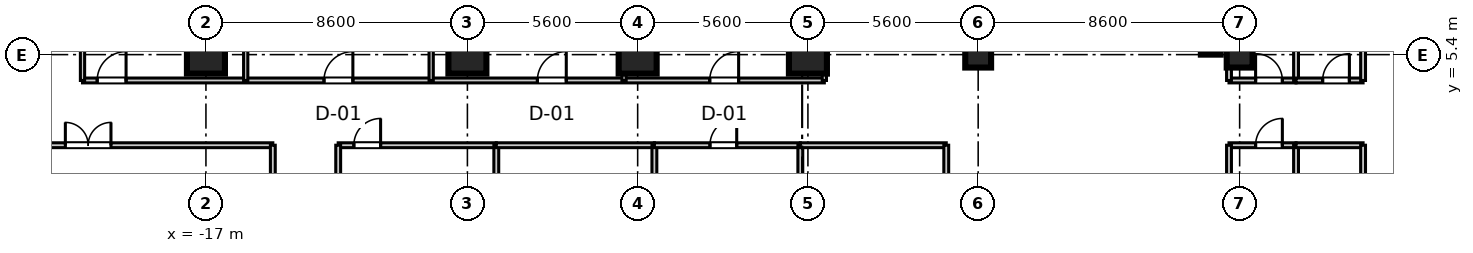
"""IFC4 building model, lengths in metres.
Left out: names, types, materials, properties, quantities, classifications, styles, units other than length and angle.
Written with IfcOpenShell. Run it as: python <this file> out.ifc"""

import sys

from ifc_helpers import new_model, si_unit, direction, frame, frame_2d, origin, origin_2d, place, context, subcontext, project, spatial, rectangle, extrude, source, transform, mapped, element, fill, save


model = new_model("IFC4")
c1 = context("Model", 3, precision=1e-05, world=origin(), true_north=direction((0.0, 1.0)))
c2 = subcontext(c1, "Body", "Model", "MODEL_VIEW")
j1 = project(units=[si_unit("LENGTHUNIT", "METRE"), si_unit("PLANEANGLEUNIT", "RADIAN")], contexts=[c1])
p1 = place(None, origin())
s1 = spatial("IfcSite", under=j1, at=p1, CompositionType="ELEMENT")
p2 = place(p1, origin())
s2 = spatial("IfcBuilding", under=s1, at=p2, CompositionType="ELEMENT")
p3 = place(p2, frame((0.0, 0.0, 132.1)))
s3 = spatial("IfcBuildingStorey", under=s2, at=p3, CompositionType="ELEMENT", Elevation=132.1)
m1 = source(origin(), c2, "Body", "SweptSolid", [
    extrude(rectangle(XDim=1.25, YDim=1.25, at=origin_2d()), origin(), (0.0, 0.0, 1.0), 3.605),
])
for number, where, z_axis, x_axis in (
    (1, (-17.0, 5.4, 0.0), (0.0, 0.0, 1.0), (1.0, 0.0, 0.0)),
    (2, (-8.4, 5.4, 0.0), (0.0, 0.0, 1.0), (1.0, 0.0, 0.0)),
    (3, (-2.8, 5.4, 0.0), (0.0, 0.0, 1.0), (1.0, 0.0, 0.0)),
    (4, (2.8, 5.4, 0.0), (0.0, 0.0, 1.0), (1.0, 0.0, 0.0)),
):
    element("IfcColumn", number, at=place(p3, frame(where, z_axis=z_axis, x_axis=x_axis)), inside=s3, PredefinedType="COLUMN", context=c2, shape_type="MappedRepresentation", body=[
        mapped(m1, transform((0.0, 0.0, 0.0), scale=1.0)),
    ])
m2 = source(origin(), c2, "Body", "SweptSolid", [
    extrude(rectangle(XDim=0.85, YDim=0.85, at=origin_2d()), origin(), (0.0, 0.0, 1.0), 3.605),
])
for number, where, z_axis, x_axis in (
    (5, (8.4, 5.4, 0.0), (0.0, 0.0, 1.0), (1.0, 0.0, 0.0)),
    (6, (17.0, 5.4, 0.0), (0.0, 0.0, 1.0), (1.0, 0.0, 0.0)),
):
    element("IfcColumn", number, at=place(p3, frame(where, z_axis=z_axis, x_axis=x_axis)), inside=s3, PredefinedType="PILASTER", context=c2, shape_type="MappedRepresentation", body=[
        mapped(m2, transform((0.0, 0.0, 0.0), scale=1.0)),
    ])
m3 = source(origin(), c2, "Body", "SweptSolid", [
    extrude(rectangle(XDim=11.6, YDim=0.65, at=frame_2d((5.8, 0.0))), origin(), (0.0, 0.0, 1.0), 3.38),
])
p4 = place(p3, frame((16.05, 5.4, 0.0), z_axis=(0.0, 0.0, 1.0), x_axis=(0.0, 1.0, 0.0)))
e7 = element("IfcWall", 7, at=p4, inside=s3, PredefinedType="SHEAR", context=c2, shape_type="MappedRepresentation", body=[
    mapped(m3, transform((0.0, 0.0, 0.0), scale=1.0)),
])
m4 = source(origin(), c2, "Body", "SweptSolid", [
    extrude(rectangle(XDim=2.205, YDim=0.16, at=frame_2d((1.103, 0.0))), origin(), (0.0, 0.0, 1.0), 2.72),
])
p5 = place(p3, frame((16.65, 4.55, 0.0), z_axis=(0.0, 0.0, 1.0), x_axis=(1.0, 0.0, 0.0)))
e8 = element("IfcWall", 8, at=p5, inside=s3, PredefinedType="PARTITIONING", context=c2, shape_type="MappedRepresentation", body=[
    mapped(m4, transform((0.0, 0.0, 0.0), scale=1.0)),
])
p6 = place(p5, frame((0.875, 0.0, 0.0)))
e9 = element("IfcOpeningElement", 9, at=p6, cuts=e8, PredefinedType="OPENING", context=c2, shape_type="SweptSolid", body=[
    extrude(rectangle(XDim=0.88, YDim=2.1, at=frame_2d((0.44, 1.05))), frame((0.0, 0.09, 0.0), z_axis=(0.0, -1.0, 0.0), x_axis=(1.0, 0.0, 0.0)), (0.0, 0.0, 1.0), 0.18),
])
m5 = source(origin(), c2, "Body", "SweptSolid", [
    extrude(rectangle(XDim=19.25, YDim=0.16, at=frame_2d((9.625, 0.0))), origin(), (0.0, 0.0, 1.0), 2.72),
])
for number, where, z_axis, x_axis in (
    (10, (16.65, 4.55, 0.0), (0.0, 0.0, 1.0), (0.0, 1.0, 0.0)),
    (11, (18.855, 4.55, 0.0), (0.0, 0.0, 1.0), (0.0, 1.0, 0.0)),
):
    element("IfcWall", number, at=place(p3, frame(where, z_axis=z_axis, x_axis=x_axis)), inside=s3, PredefinedType="PARTITIONING", context=c2, shape_type="MappedRepresentation", body=[
        mapped(m5, transform((0.0, 0.0, 0.0), scale=1.0)),
    ])
p7 = place(p3, frame((18.855, 4.55, 0.0), z_axis=(0.0, 0.0, 1.0), x_axis=(1.0, 0.0, 0.0)))
e12 = element("IfcWall", 12, at=p7, inside=s3, PredefinedType="PARTITIONING", context=c2, shape_type="MappedRepresentation", body=[
    mapped(m4, transform((0.0, 0.0, 0.0), scale=1.0)),
])
p8 = place(p7, frame((0.875, 0.0, 0.0)))
e13 = element("IfcOpeningElement", 13, at=p8, cuts=e12, PredefinedType="OPENING", context=c2, shape_type="SweptSolid", body=[
    extrude(rectangle(XDim=0.88, YDim=2.1, at=frame_2d((0.44, 1.05))), frame((0.0, 0.09, 0.0), z_axis=(0.0, -1.0, 0.0), x_axis=(1.0, 0.0, 0.0)), (0.0, 0.0, 1.0), 0.18),
])
m6 = source(origin(), c2, "Body", "SweptSolid", [
    extrude(rectangle(XDim=17.83, YDim=0.16, at=frame_2d((8.915, 0.0))), origin(), (0.0, 0.0, 1.0), 2.72),
])
p9 = place(p3, frame((21.06, 4.55, 0.0), z_axis=(0.0, 0.0, 1.0), x_axis=(0.0, 1.0, 0.0)))
e14 = element("IfcWall", 14, at=p9, inside=s3, PredefinedType="PARTITIONING", context=c2, shape_type="MappedRepresentation", body=[
    mapped(m6, transform((0.0, 0.0, 0.0), scale=1.0)),
])
m7 = source(origin(), c2, "Body", "SweptSolid", [
    extrude(rectangle(XDim=24.4, YDim=0.16, at=frame_2d((12.2, 0.0))), origin(), (0.0, 0.0, 1.0), 2.72),
])
p10 = place(p3, frame((-21.06, 4.55, 0.0), z_axis=(0.0, 0.0, 1.0), x_axis=(1.0, 0.0, 0.0)))
e15 = element("IfcWall", 15, at=p10, inside=s3, PredefinedType="PARTITIONING", context=c2, shape_type="MappedRepresentation", body=[
    mapped(m7, transform((0.0, 0.0, 0.0), scale=1.0)),
])
p11 = place(p10, frame((0.483, 0.0, 0.0)))
e16 = element("IfcOpeningElement", 16, at=p11, cuts=e15, PredefinedType="OPENING", context=c2, shape_type="SweptSolid", body=[
    extrude(rectangle(XDim=0.95, YDim=2.1, at=frame_2d((0.475, 1.05))), frame((0.0, 0.09, 0.0), z_axis=(0.0, -1.0, 0.0), x_axis=(1.0, 0.0, 0.0)), (0.0, 0.0, 1.0), 0.18),
])
p12 = place(p10, frame((7.943, 0.0, 0.0)))
e17 = element("IfcOpeningElement", 17, at=p12, cuts=e15, PredefinedType="OPENING", context=c2, shape_type="SweptSolid", body=[
    extrude(rectangle(XDim=0.95, YDim=2.1, at=frame_2d((0.475, 1.05))), frame((0.0, 0.09, 0.0), z_axis=(0.0, -1.0, 0.0), x_axis=(1.0, 0.0, 0.0)), (0.0, 0.0, 1.0), 0.18),
])
p13 = place(p10, frame((14.962, 0.0, 0.0)))
e18 = element("IfcOpeningElement", 18, at=p13, cuts=e15, PredefinedType="OPENING", context=c2, shape_type="SweptSolid", body=[
    extrude(rectangle(XDim=0.95, YDim=2.1, at=frame_2d((0.475, 1.05))), frame((0.0, 0.09, 0.0), z_axis=(0.0, -1.0, 0.0), x_axis=(1.0, 0.0, 0.0)), (0.0, 0.0, 1.0), 0.18),
])
p14 = place(p10, frame((20.631, 0.0, 0.0)))
e19 = element("IfcOpeningElement", 19, at=p14, cuts=e15, PredefinedType="OPENING", context=c2, shape_type="SweptSolid", body=[
    extrude(rectangle(XDim=0.95, YDim=2.1, at=frame_2d((0.475, 1.05))), frame((0.0, 0.09, 0.0), z_axis=(0.0, -1.0, 0.0), x_axis=(1.0, 0.0, 0.0)), (0.0, 0.0, 1.0), 0.18),
])
m8 = source(origin(), c2, "Body", "SweptSolid", [
    extrude(rectangle(XDim=17.83, YDim=0.14, at=frame_2d((8.915, 0.0))), origin(), (0.0, 0.0, 1.0), 2.72),
])
p15 = place(p3, frame((-21.06, 4.55, 0.0), z_axis=(0.0, 0.0, 1.0), x_axis=(0.0, 1.0, 0.0)))
e20 = element("IfcWall", 20, at=p15, inside=s3, PredefinedType="PARTITIONING", context=c2, shape_type="MappedRepresentation", body=[
    mapped(m8, transform((0.0, 0.0, 0.0), scale=1.0)),
])
m9 = source(origin(), c2, "Body", "SweptSolid", [
    extrude(rectangle(XDim=19.25, YDim=0.14, at=frame_2d((9.625, 0.0))), origin(), (0.0, 0.0, 1.0), 2.72),
])
for number, where, z_axis, x_axis in (
    (21, (3.34, 4.55, 0.0), (0.0, 0.0, 1.0), (0.0, 1.0, 0.0)),
    (22, (-15.692, 4.55, 0.0), (0.0, 0.0, 1.0), (0.0, 1.0, 0.0)),
    (23, (-9.592, 4.55, 0.0), (0.0, 0.0, 1.0), (0.0, 1.0, 0.0)),
    (24, (-3.248, 4.55, 0.0), (0.0, 0.0, 1.0), (0.0, 1.0, 0.0)),
):
    element("IfcWall", number, at=place(p3, frame(where, z_axis=z_axis, x_axis=x_axis)), inside=s3, PredefinedType="PARTITIONING", context=c2, shape_type="MappedRepresentation", body=[
        mapped(m9, transform((0.0, 0.0, 0.0), scale=1.0)),
    ])
m10 = source(origin(), c2, "Body", "SweptSolid", [
    extrude(rectangle(XDim=9.0, YDim=0.16, at=frame_2d((4.5, 0.0))), origin(), (0.0, 0.0, 1.0), 2.72),
])
p16 = place(p3, frame((-23.8, 2.42, 0.0), z_axis=(0.0, 0.0, 1.0), x_axis=(1.0, 0.0, 0.0)))
e25 = element("IfcWall", 25, at=p16, inside=s3, PredefinedType="PARTITIONING", context=c2, shape_type="MappedRepresentation", body=[
    mapped(m10, transform((0.0, 0.0, 0.0), scale=1.0)),
])
p17 = place(p16, frame((2.176, 0.0, 0.0)))
e26 = element("IfcOpeningElement", 26, at=p17, cuts=e25, PredefinedType="OPENING", context=c2, shape_type="SweptSolid", body=[
    extrude(rectangle(XDim=1.5, YDim=2.15, at=frame_2d((0.75, 1.075))), frame((0.0, 0.09, 0.0), z_axis=(0.0, -1.0, 0.0), x_axis=(1.0, 0.0, 0.0)), (0.0, 0.0, 1.0), 0.18),
])
m11 = source(origin(), c2, "Body", "SweptSolid", [
    extrude(rectangle(XDim=4.84, YDim=0.16, at=frame_2d((2.42, 0.0))), origin(), (0.0, 0.0, 1.0), 2.72),
])
p18 = place(p3, frame((-14.8, -2.42, 0.0), z_axis=(0.0, 0.0, 1.0), x_axis=(0.0, 1.0, 0.0)))
e27 = element("IfcWall", 27, at=p18, inside=s3, PredefinedType="PARTITIONING", context=c2, shape_type="MappedRepresentation", body=[
    mapped(m11, transform((0.0, 0.0, 0.0), scale=1.0)),
])
m12 = source(origin(), c2, "Body", "SweptSolid", [
    extrude(rectangle(XDim=5.2, YDim=0.16, at=frame_2d((2.6, 0.0))), origin(), (0.0, 0.0, 1.0), 2.72),
])
p19 = place(p3, frame((-12.65, 2.42, 0.0), z_axis=(0.0, 0.0, 1.0), x_axis=(1.0, 0.0, 0.0)))
e28 = element("IfcWall", 28, at=p19, inside=s3, PredefinedType="PARTITIONING", context=c2, shape_type="MappedRepresentation", body=[
    mapped(m12, transform((0.0, 0.0, 0.0), scale=1.0)),
])
p20 = place(p19, frame((0.515, 0.0, 0.0)))
e29 = element("IfcOpeningElement", 29, at=p20, cuts=e28, PredefinedType="OPENING", context=c2, shape_type="SweptSolid", body=[
    extrude(rectangle(XDim=0.88, YDim=2.1, at=frame_2d((0.44, 1.05))), frame((0.0, 0.09, 0.0), z_axis=(0.0, -1.0, 0.0), x_axis=(1.0, 0.0, 0.0)), (0.0, 0.0, 1.0), 0.18),
])
for number, where, z_axis, x_axis in (
    (30, (-12.65, -2.42, 0.0), (0.0, 0.0, 1.0), (0.0, 1.0, 0.0)),
    (31, (-7.45, -2.42, 0.0), (0.0, 0.0, 1.0), (0.0, 1.0, 0.0)),
):
    element("IfcWall", number, at=place(p3, frame(where, z_axis=z_axis, x_axis=x_axis)), inside=s3, PredefinedType="PARTITIONING", context=c2, shape_type="MappedRepresentation", body=[
        mapped(m11, transform((0.0, 0.0, 0.0), scale=1.0)),
    ])
p21 = place(p3, frame((-7.45, 2.42, 0.0), z_axis=(0.0, 0.0, 1.0), x_axis=(1.0, 0.0, 0.0)))
e32 = element("IfcWall", 32, at=p21, inside=s3, PredefinedType="PARTITIONING", context=c2, shape_type="MappedRepresentation", body=[
    mapped(m12, transform((0.0, 0.0, 0.0), scale=1.0)),
])
p22 = place(p3, frame((-2.25, -2.42, 0.0), z_axis=(0.0, 0.0, 1.0), x_axis=(0.0, 1.0, 0.0)))
e33 = element("IfcWall", 33, at=p22, inside=s3, PredefinedType="PARTITIONING", context=c2, shape_type="MappedRepresentation", body=[
    mapped(m11, transform((0.0, 0.0, 0.0), scale=1.0)),
])
m13 = source(origin(), c2, "Body", "SweptSolid", [
    extrude(rectangle(XDim=4.8, YDim=0.16, at=frame_2d((2.4, 0.0))), origin(), (0.0, 0.0, 1.0), 2.72),
])
p23 = place(p3, frame((-2.25, 2.42, 0.0), z_axis=(0.0, 0.0, 1.0), x_axis=(1.0, 0.0, 0.0)))
e34 = element("IfcWall", 34, at=p23, inside=s3, PredefinedType="PARTITIONING", context=c2, shape_type="MappedRepresentation", body=[
    mapped(m13, transform((0.0, 0.0, 0.0), scale=1.0)),
])
p24 = place(p23, frame((1.828, 0.0, 0.0)))
e35 = element("IfcOpeningElement", 35, at=p24, cuts=e34, PredefinedType="OPENING", context=c2, shape_type="SweptSolid", body=[
    extrude(rectangle(XDim=0.88, YDim=2.1, at=frame_2d((0.44, 1.05))), frame((0.0, 0.09, 0.0), z_axis=(0.0, -1.0, 0.0), x_axis=(1.0, 0.0, 0.0)), (0.0, 0.0, 1.0), 0.18),
])
p25 = place(p3, frame((2.55, -2.42, 0.0), z_axis=(0.0, 0.0, 1.0), x_axis=(0.0, 1.0, 0.0)))
e36 = element("IfcWall", 36, at=p25, inside=s3, PredefinedType="PARTITIONING", context=c2, shape_type="MappedRepresentation", body=[
    mapped(m11, transform((0.0, 0.0, 0.0), scale=1.0)),
])
p26 = place(p3, frame((2.55, 2.42, 0.0), z_axis=(0.0, 0.0, 1.0), x_axis=(1.0, 0.0, 0.0)))
e37 = element("IfcWall", 37, at=p26, inside=s3, PredefinedType="PARTITIONING", context=c2, shape_type="MappedRepresentation", body=[
    mapped(m13, transform((0.0, 0.0, 0.0), scale=1.0)),
])
p27 = place(p3, frame((7.35, -2.42, 0.0), z_axis=(0.0, 0.0, 1.0), x_axis=(0.0, 1.0, 0.0)))
e38 = element("IfcWall", 38, at=p27, inside=s3, PredefinedType="PARTITIONING", context=c2, shape_type="MappedRepresentation", body=[
    mapped(m11, transform((0.0, 0.0, 0.0), scale=1.0)),
])
p28 = place(p3, frame((16.65, 2.42, 0.0), z_axis=(0.0, 0.0, 1.0), x_axis=(1.0, 0.0, 0.0)))
e39 = element("IfcWall", 39, at=p28, inside=s3, PredefinedType="PARTITIONING", context=c2, shape_type="MappedRepresentation", body=[
    mapped(m4, transform((0.0, 0.0, 0.0), scale=1.0)),
])
p29 = place(p28, frame((0.875, 0.0, 0.0)))
e40 = element("IfcOpeningElement", 40, at=p29, cuts=e39, PredefinedType="OPENING", context=c2, shape_type="SweptSolid", body=[
    extrude(rectangle(XDim=0.88, YDim=2.1, at=frame_2d((0.44, 1.05))), frame((0.0, 0.09, 0.0), z_axis=(0.0, -1.0, 0.0), x_axis=(1.0, 0.0, 0.0)), (0.0, 0.0, 1.0), 0.18),
])
for number, where, z_axis, x_axis in (
    (41, (16.65, -2.42, 0.0), (0.0, 0.0, 1.0), (0.0, 1.0, 0.0)),
    (42, (18.855, -2.42, 0.0), (0.0, 0.0, 1.0), (0.0, 1.0, 0.0)),
):
    element("IfcWall", number, at=place(p3, frame(where, z_axis=z_axis, x_axis=x_axis)), inside=s3, PredefinedType="PARTITIONING", context=c2, shape_type="MappedRepresentation", body=[
        mapped(m11, transform((0.0, 0.0, 0.0), scale=1.0)),
    ])
p30 = place(p3, frame((18.855, 2.42, 0.0), z_axis=(0.0, 0.0, 1.0), x_axis=(1.0, 0.0, 0.0)))
e43 = element("IfcWall", 43, at=p30, inside=s3, PredefinedType="PARTITIONING", context=c2, shape_type="MappedRepresentation", body=[
    mapped(m4, transform((0.0, 0.0, 0.0), scale=1.0)),
])
p31 = place(p3, frame((21.06, -2.42, 0.0), z_axis=(0.0, 0.0, 1.0), x_axis=(0.0, 1.0, 0.0)))
e44 = element("IfcWall", 44, at=p31, inside=s3, PredefinedType="PARTITIONING", context=c2, shape_type="MappedRepresentation", body=[
    mapped(m11, transform((0.0, 0.0, 0.0), scale=1.0)),
])
m14 = source(origin(), c2, "Body", "SweptSolid", [
    extrude(rectangle(XDim=0.88, YDim=2.1, at=frame_2d((0.44, 1.05))), frame((0.0, 0.025, 0.0), z_axis=(0.0, -1.0, 0.0), x_axis=(1.0, 0.0, 0.0)), (0.0, 0.0, 1.0), 0.05),
])
p32 = place(p6, origin())
e45 = element("IfcDoor", 45, at=p32, inside=s3, OperationType="SINGLE_SWING_LEFT", PredefinedType="DOOR", context=c2, shape_type="MappedRepresentation", body=[
    mapped(m14, transform((0.0, 0.0, 0.0), scale=1.0)),
])
fill(e9, e45)
p33 = place(p8, origin())
e46 = element("IfcDoor", 46, at=p33, inside=s3, OperationType="SINGLE_SWING_RIGHT", PredefinedType="DOOR", context=c2, shape_type="MappedRepresentation", body=[
    mapped(m14, transform((0.0, 0.0, 0.0), scale=1.0)),
])
fill(e13, e46)
m15 = source(origin(), c2, "Body", "SweptSolid", [
    extrude(rectangle(XDim=0.95, YDim=2.1, at=frame_2d((0.475, 1.05))), frame((0.0, 0.025, 0.0), z_axis=(0.0, -1.0, 0.0), x_axis=(1.0, 0.0, 0.0)), (0.0, 0.0, 1.0), 0.05),
])
p34 = place(p11, origin())
e47 = element("IfcDoor", 47, at=p34, inside=s3, OperationType="SINGLE_SWING_RIGHT", PredefinedType="DOOR", context=c2, shape_type="MappedRepresentation", body=[
    mapped(m15, transform((0.0, 0.0, 0.0), scale=1.0)),
])
fill(e16, e47)
p35 = place(p12, origin())
e48 = element("IfcDoor", 48, at=p35, inside=s3, OperationType="SINGLE_SWING_RIGHT", PredefinedType="DOOR", context=c2, shape_type="MappedRepresentation", body=[
    mapped(m15, transform((0.0, 0.0, 0.0), scale=1.0)),
])
fill(e17, e48)
p36 = place(p13, origin())
e49 = element("IfcDoor", 49, at=p36, inside=s3, OperationType="SINGLE_SWING_RIGHT", PredefinedType="DOOR", context=c2, shape_type="MappedRepresentation", body=[
    mapped(m15, transform((0.0, 0.0, 0.0), scale=1.0)),
])
fill(e18, e49)
p37 = place(p14, origin())
e50 = element("IfcDoor", 50, at=p37, inside=s3, OperationType="SINGLE_SWING_RIGHT", PredefinedType="DOOR", context=c2, shape_type="MappedRepresentation", body=[
    mapped(m15, transform((0.0, 0.0, 0.0), scale=1.0)),
])
fill(e19, e50)
m16 = source(origin(), c2, "Body", "SweptSolid", [
    extrude(rectangle(XDim=1.5, YDim=2.15, at=frame_2d((0.75, 1.075))), frame((0.0, 0.025, 0.0), z_axis=(0.0, -1.0, 0.0), x_axis=(1.0, 0.0, 0.0)), (0.0, 0.0, 1.0), 0.05),
])
p38 = place(p17, origin())
e51 = element("IfcDoor", 51, at=p38, inside=s3, OperationType="DOUBLE_DOOR_SINGLE_SWING", PredefinedType="DOOR", context=c2, shape_type="MappedRepresentation", body=[
    mapped(m16, transform((0.0, 0.0, 0.0), scale=1.0)),
])
fill(e26, e51)
p39 = place(p20, frame((0.88, 0.0, 0.0), z_axis=(0.0, 0.0, 1.0), x_axis=(-1.0, 0.0, 0.0)))
e52 = element("IfcDoor", 52, at=p39, inside=s3, OperationType="SINGLE_SWING_RIGHT", PredefinedType="DOOR", context=c2, shape_type="MappedRepresentation", body=[
    mapped(m14, transform((0.0, 0.0, 0.0), scale=1.0)),
])
fill(e29, e52)
p40 = place(p24, frame((0.88, 0.0, 0.0), z_axis=(0.0, 0.0, 1.0), x_axis=(-1.0, 0.0, 0.0)))
e53 = element("IfcDoor", 53, at=p40, inside=s3, OperationType="SINGLE_SWING_RIGHT", PredefinedType="DOOR", context=c2, shape_type="MappedRepresentation", body=[
    mapped(m14, transform((0.0, 0.0, 0.0), scale=1.0)),
])
fill(e35, e53)
p41 = place(p29, frame((0.88, 0.0, 0.0), z_axis=(0.0, 0.0, 1.0), x_axis=(-1.0, 0.0, 0.0)))
e54 = element("IfcDoor", 54, at=p41, inside=s3, OperationType="SINGLE_SWING_RIGHT", PredefinedType="DOOR", context=c2, shape_type="MappedRepresentation", body=[
    mapped(m14, transform((0.0, 0.0, 0.0), scale=1.0)),
])
fill(e40, e54)
save(model, sys.argv[1])
